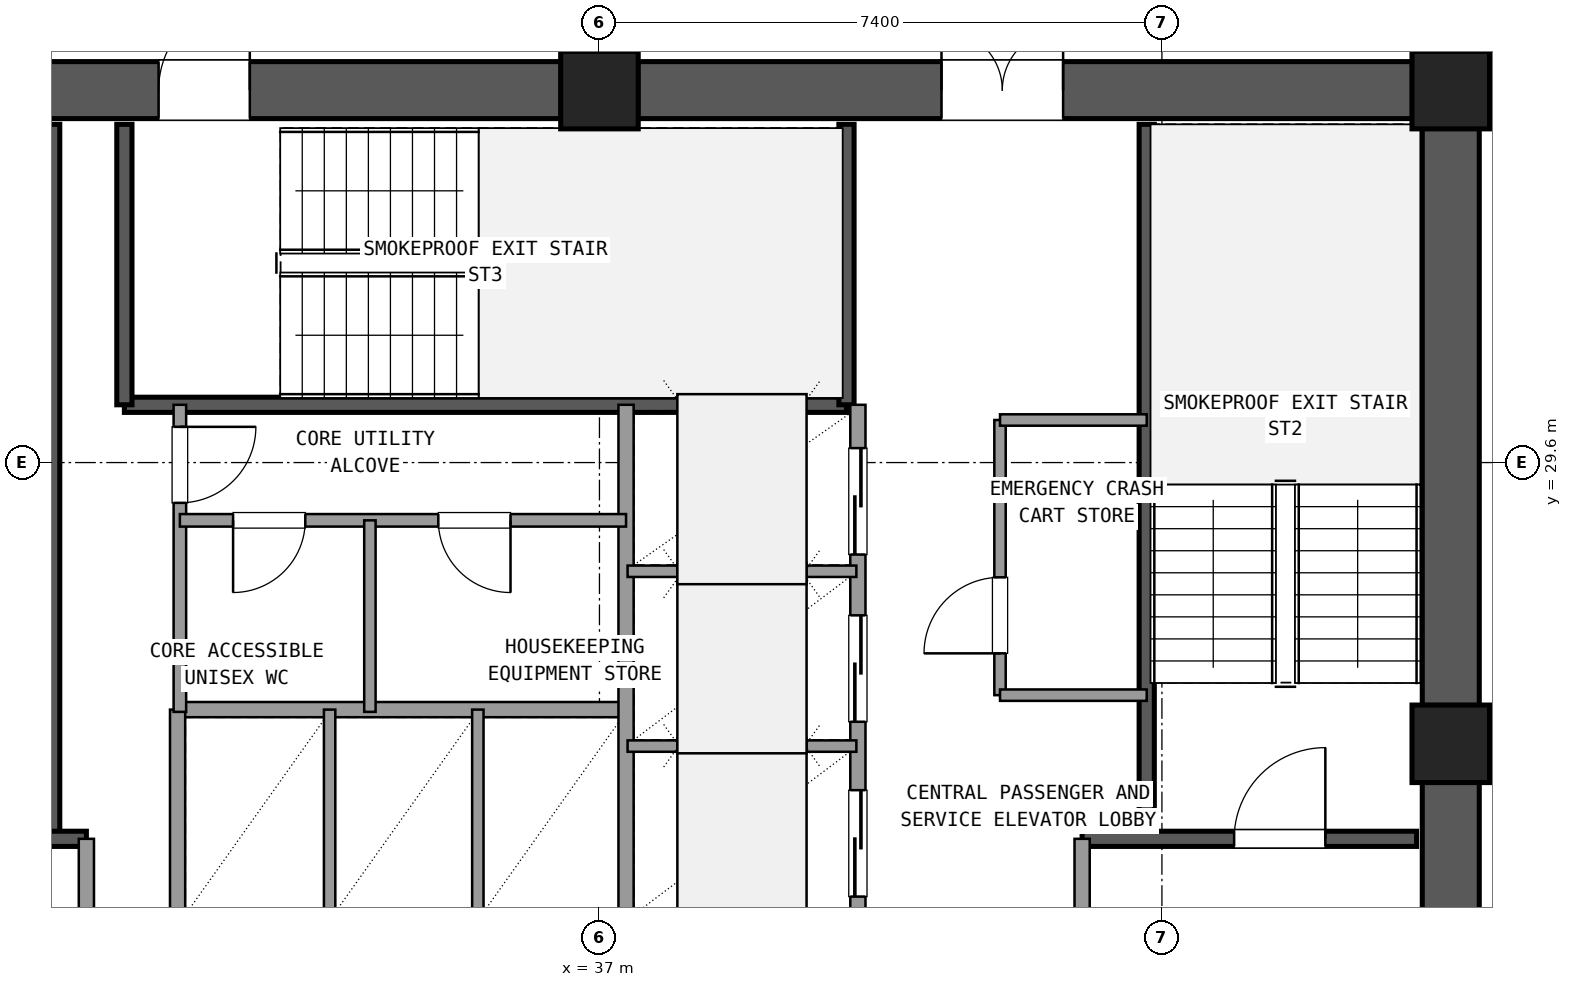
"""IFC4 building model, lengths in metres.
Left out: names, types, materials, properties, quantities, classifications, styles, units other than length and angle.
Written with IfcOpenShell. Run it as: python <this file> out.ifc"""

import sys

from ifc_helpers import new_model, si_unit, direction, frame, frame_2d, origin, origin_2d, place, context, subcontext, project, spatial, rectangle, extrude, element, fill, save


model = new_model("IFC4")
c1 = context("Model", 3, precision=1e-05, world=origin(), true_north=direction((0.0, 1.0)))
c2 = subcontext(c1, "Body", "Model", "MODEL_VIEW")
j1 = project(units=[si_unit("LENGTHUNIT", "METRE"), si_unit("PLANEANGLEUNIT", "RADIAN")], contexts=[c1])
p1 = place(None, origin())
s1 = spatial("IfcSite", under=j1, at=p1, CompositionType="ELEMENT")
p2 = place(p1, origin())
s2 = spatial("IfcBuilding", under=s1, at=p2, CompositionType="ELEMENT")
p3 = place(p2, frame((0.0, 0.0, 91.98)))
s3 = spatial("IfcBuildingStorey", under=s2, at=p3, CompositionType="ELEMENT", Elevation=91.98)
for number, where, z_axis, x_axis in (
    (1, (48.2, 25.9, 0.0), (0.0, 0.0, 1.0), (1.0, 0.0, 0.0)),
    (2, (48.2, 34.5, 0.0), (0.0, 0.0, 1.0), (1.0, 0.0, 0.0)),
    (3, (37.0, 34.5, 0.0), (0.0, 0.0, 1.0), (1.0, 0.0, 0.0)),
):
    element("IfcColumn", number, at=place(p3, frame(where, z_axis=z_axis, x_axis=x_axis)), inside=s3, PredefinedType="COLUMN", context=c2, shape_type="SweptSolid", body=[
        extrude(rectangle(XDim=1.02, YDim=1.02, at=origin_2d()), origin(), (0.0, 0.0, 1.0), 3.6),
    ])
p4 = place(p3, frame((48.2, 17.805, 0.0), z_axis=(0.0, 0.0, 1.0), x_axis=(0.0, 1.0, 0.0)))
e4 = element("IfcWall", 4, at=p4, inside=s3, PredefinedType="SHEAR", context=c2, shape_type="SweptSolid", body=[
    extrude(rectangle(XDim=7.59, YDim=0.75, at=frame_2d((3.795, 0.0))), origin(), (0.0, 0.0, 1.0), 3.32),
])
p5 = place(p4, frame((4.245, 0.0, 0.0)))
e5 = element("IfcOpeningElement", 5, at=p5, cuts=e4, PredefinedType="OPENING", context=c2, shape_type="SweptSolid", body=[
    extrude(rectangle(XDim=1.2, YDim=2.15, at=frame_2d((0.6, 1.075))), frame((0.0, 0.385, 0.0), z_axis=(0.0, -1.0, 0.0), x_axis=(1.0, 0.0, 0.0)), (0.0, 0.0, 1.0), 0.77),
])
p6 = place(p3, frame((48.2, 26.405, 0.0), z_axis=(0.0, 0.0, 1.0), x_axis=(0.0, 1.0, 0.0)))
e6 = element("IfcWall", 6, at=p6, inside=s3, PredefinedType="SHEAR", context=c2, shape_type="SweptSolid", body=[
    extrude(rectangle(XDim=7.59, YDim=0.75, at=frame_2d((3.795, 0.0))), origin(), (0.0, 0.0, 1.0), 3.32),
])
p7 = place(p3, frame((47.695, 34.5, 0.0), z_axis=(0.0, 0.0, 1.0), x_axis=(-1.0, 0.0, 0.0)))
e7 = element("IfcWall", 7, at=p7, inside=s3, PredefinedType="SHEAR", context=c2, shape_type="SweptSolid", body=[
    extrude(rectangle(XDim=10.19, YDim=0.75, at=frame_2d((5.095, 0.0))), origin(), (0.0, 0.0, 1.0), 3.32),
])
p8 = place(p7, frame((4.595, 0.0, 0.0)))
e8 = element("IfcOpeningElement", 8, at=p8, cuts=e7, PredefinedType="OPENING", context=c2, shape_type="SweptSolid", body=[
    extrude(rectangle(XDim=1.6, YDim=2.2, at=frame_2d((0.8, 1.1))), frame((0.0, 0.385, 0.0), z_axis=(0.0, -1.0, 0.0), x_axis=(1.0, 0.0, 0.0)), (0.0, 0.0, 1.0), 0.77),
])
p9 = place(p3, frame((36.495, 34.5, 0.0), z_axis=(0.0, 0.0, 1.0), x_axis=(-1.0, 0.0, 0.0)))
e9 = element("IfcWall", 9, at=p9, inside=s3, PredefinedType="SHEAR", context=c2, shape_type="SweptSolid", body=[
    extrude(rectangle(XDim=10.19, YDim=0.75, at=frame_2d((5.095, 0.0))), origin(), (0.0, 0.0, 1.0), 3.32),
])
p10 = place(p9, frame((4.095, 0.0, 0.0)))
e10 = element("IfcOpeningElement", 10, at=p10, cuts=e9, PredefinedType="OPENING", context=c2, shape_type="SweptSolid", body=[
    extrude(rectangle(XDim=1.2, YDim=2.15, at=frame_2d((0.6, 1.075))), frame((0.0, 0.385, 0.0), z_axis=(0.0, -1.0, 0.0), x_axis=(1.0, 0.0, 0.0)), (0.0, 0.0, 1.0), 0.77),
])
p11 = place(p3, frame((29.8, 24.65, 0.0), z_axis=(0.0, 0.0, 1.0), x_axis=(0.0, 1.0, 0.0)))
e11 = element("IfcWall", 11, at=p11, inside=s3, PredefinedType="SHEAR", context=c2, shape_type="SweptSolid", body=[
    extrude(rectangle(XDim=9.4, YDim=0.2, at=frame_2d((4.7, 0.0))), origin(), (0.0, 0.0, 1.0), 3.32),
])
p12 = place(p3, frame((26.25, 24.65, 0.0), z_axis=(0.0, 0.0, 1.0), x_axis=(1.0, 0.0, 0.0)))
e12 = element("IfcWall", 12, at=p12, inside=s3, PredefinedType="SHEAR", context=c2, shape_type="SweptSolid", body=[
    extrude(rectangle(XDim=4.0, YDim=0.2, at=frame_2d((2.0, 0.0))), origin(), (0.0, 0.0, 1.0), 3.32),
])
p13 = place(p12, frame((1.0, 0.0, 0.0)))
e13 = element("IfcOpeningElement", 13, at=p13, cuts=e12, PredefinedType="OPENING", context=c2, shape_type="SweptSolid", body=[
    extrude(rectangle(XDim=1.2, YDim=2.15, at=frame_2d((0.6, 1.075))), frame((0.0, 0.11, 0.0), z_axis=(0.0, -1.0, 0.0), x_axis=(1.0, 0.0, 0.0)), (0.0, 0.0, 1.0), 0.22),
])
p14 = place(p3, frame((44.2, 24.65, 0.0), z_axis=(0.0, 0.0, 1.0), x_axis=(0.0, 1.0, 0.0)))
e14 = element("IfcWall", 14, at=p14, inside=s3, PredefinedType="SHEAR", context=c2, shape_type="SweptSolid", body=[
    extrude(rectangle(XDim=9.4, YDim=0.2, at=frame_2d((4.7, 0.0))), origin(), (0.0, 0.0, 1.0), 3.32),
])
p15 = place(p3, frame((43.35, 24.65, 0.0), z_axis=(0.0, 0.0, 1.0), x_axis=(1.0, 0.0, 0.0)))
e15 = element("IfcWall", 15, at=p15, inside=s3, PredefinedType="SHEAR", context=c2, shape_type="SweptSolid", body=[
    extrude(rectangle(XDim=4.4, YDim=0.2, at=frame_2d((2.2, 0.0))), origin(), (0.0, 0.0, 1.0), 3.32),
])
p16 = place(p15, frame((2.0, 0.0, 0.0)))
e16 = element("IfcOpeningElement", 16, at=p16, cuts=e15, PredefinedType="OPENING", context=c2, shape_type="SweptSolid", body=[
    extrude(rectangle(XDim=1.2, YDim=2.15, at=frame_2d((0.6, 1.075))), frame((0.0, 0.11, 0.0), z_axis=(0.0, -1.0, 0.0), x_axis=(1.0, 0.0, 0.0)), (0.0, 0.0, 1.0), 0.22),
])
p17 = place(p3, frame((30.75, 30.36, 0.0), z_axis=(0.0, 0.0, 1.0), x_axis=(1.0, 0.0, 0.0)))
e17 = element("IfcWall", 17, at=p17, inside=s3, PredefinedType="SHEAR", context=c2, shape_type="SweptSolid", body=[
    extrude(rectangle(XDim=9.5, YDim=0.2, at=frame_2d((4.75, 0.0))), origin(), (0.0, 0.0, 1.0), 3.32),
])
for number, where, z_axis, x_axis in (
    (18, (30.75, 30.36, 0.0), (0.0, 0.0, 1.0), (0.0, 1.0, 0.0)),
    (19, (40.25, 30.36, 0.0), (0.0, 0.0, 1.0), (0.0, 1.0, 0.0)),
):
    element("IfcWall", number, at=place(p3, frame(where, z_axis=z_axis, x_axis=x_axis)), inside=s3, PredefinedType="SHEAR", context=c2, shape_type="SweptSolid", body=[
        extrude(rectangle(XDim=3.69, YDim=0.2, at=frame_2d((1.845, 0.0))), origin(), (0.0, 0.0, 1.0), 3.32),
    ])
p18 = place(p3, frame((30.25, 17.75, 0.0), z_axis=(0.0, 0.0, 1.0), x_axis=(0.0, 1.0, 0.0)))
e20 = element("IfcWall", 20, at=p18, inside=s3, PredefinedType="SOLIDWALL", context=c2, shape_type="SweptSolid", body=[
    extrude(rectangle(XDim=6.9, YDim=0.2, at=frame_2d((3.45, 0.0))), origin(), (0.0, 0.0, 1.0), 2.61),
])
p19 = place(p18, frame((4.15, 0.0, 0.0)))
e21 = element("IfcOpeningElement", 21, at=p19, cuts=e20, PredefinedType="OPENING", context=c2, shape_type="SweptSolid", body=[
    extrude(rectangle(XDim=1.2, YDim=2.15, at=frame_2d((0.6, 1.075))), frame((0.0, 0.11, 0.0), z_axis=(0.0, -1.0, 0.0), x_axis=(1.0, 0.0, 0.0)), (0.0, 0.0, 1.0), 0.22),
])
p20 = place(p3, frame((43.35, 17.75, 0.0), z_axis=(0.0, 0.0, 1.0), x_axis=(0.0, 1.0, 0.0)))
e22 = element("IfcWall", 22, at=p20, inside=s3, PredefinedType="SOLIDWALL", context=c2, shape_type="SweptSolid", body=[
    extrude(rectangle(XDim=6.9, YDim=0.2, at=frame_2d((3.45, 0.0))), origin(), (0.0, 0.0, 1.0), 2.61),
])
p21 = place(p20, frame((4.15, 0.0, 0.0)))
e23 = element("IfcOpeningElement", 23, at=p21, cuts=e22, PredefinedType="OPENING", context=c2, shape_type="SweptSolid", body=[
    extrude(rectangle(XDim=1.2, YDim=2.15, at=frame_2d((0.6, 1.075))), frame((0.0, 0.11, 0.0), z_axis=(0.0, -1.0, 0.0), x_axis=(1.0, 0.0, 0.0)), (0.0, 0.0, 1.0), 0.22),
])
p22 = place(p3, frame((31.45, 26.35, 0.0), z_axis=(0.0, 0.0, 1.0), x_axis=(1.0, 0.0, 0.0)))
e24 = element("IfcWall", 24, at=p22, inside=s3, PredefinedType="SOLIDWALL", context=c2, shape_type="SweptSolid", body=[
    extrude(rectangle(XDim=5.9, YDim=0.2, at=frame_2d((2.95, 0.0))), origin(), (0.0, 0.0, 1.0), 2.61),
])
p23 = place(p3, frame((31.45, 23.54, 0.0), z_axis=(0.0, 0.0, 1.0), x_axis=(0.0, 1.0, 0.0)))
e25 = element("IfcWall", 25, at=p23, inside=s3, PredefinedType="SOLIDWALL", context=c2, shape_type="SweptSolid", body=[
    extrude(rectangle(XDim=2.81, YDim=0.2, at=frame_2d((1.405, 0.0))), origin(), (0.0, 0.0, 1.0), 2.61),
])
for number, where, z_axis, x_axis in (
    (26, (33.45, 23.54, 0.0), (0.0, 0.0, 1.0), (0.0, 1.0, 0.0)),
    (27, (35.4, 23.54, 0.0), (0.0, 0.0, 1.0), (0.0, 1.0, 0.0)),
):
    element("IfcWall", number, at=place(p3, frame(where, z_axis=z_axis, x_axis=x_axis)), inside=s3, PredefinedType="PARTITIONING", context=c2, shape_type="SweptSolid", body=[
        extrude(rectangle(XDim=2.81, YDim=0.15, at=frame_2d((1.405, 0.0))), origin(), (0.0, 0.0, 1.0), 2.61),
    ])
p24 = place(p3, frame((37.35, 23.54, 0.0), z_axis=(0.0, 0.0, 1.0), x_axis=(0.0, 1.0, 0.0)))
e28 = element("IfcWall", 28, at=p24, inside=s3, PredefinedType="SOLIDWALL", context=c2, shape_type="SweptSolid", body=[
    extrude(rectangle(XDim=6.82, YDim=0.2, at=frame_2d((3.41, 0.0))), origin(), (0.0, 0.0, 1.0), 2.61),
])
p25 = place(p3, frame((40.4, 23.54, 0.0), z_axis=(0.0, 0.0, 1.0), x_axis=(0.0, 1.0, 0.0)))
e29 = element("IfcWall", 29, at=p25, inside=s3, PredefinedType="SOLIDWALL", context=c2, shape_type="SweptSolid", body=[
    extrude(rectangle(XDim=6.82, YDim=0.2, at=frame_2d((3.41, 0.0))), origin(), (0.0, 0.0, 1.0), 2.61),
])
p26 = place(p25, frame((0.35, 0.0, 0.0)))
e30 = element("IfcOpeningElement", 30, at=p26, cuts=e29, PredefinedType="OPENING", context=c2, shape_type="SweptSolid", body=[
    extrude(rectangle(XDim=1.4, YDim=2.2, at=frame_2d((0.7, 1.1))), frame((0.0, 0.11, 0.0), z_axis=(0.0, -1.0, 0.0), x_axis=(1.0, 0.0, 0.0)), (0.0, 0.0, 1.0), 0.22),
])
p27 = place(p25, frame((2.65, 0.0, 0.0)))
e31 = element("IfcOpeningElement", 31, at=p27, cuts=e29, PredefinedType="OPENING", context=c2, shape_type="SweptSolid", body=[
    extrude(rectangle(XDim=1.4, YDim=2.2, at=frame_2d((0.7, 1.1))), frame((0.0, 0.11, 0.0), z_axis=(0.0, -1.0, 0.0), x_axis=(1.0, 0.0, 0.0)), (0.0, 0.0, 1.0), 0.22),
])
p28 = place(p25, frame((4.85, 0.0, 0.0)))
e32 = element("IfcOpeningElement", 32, at=p28, cuts=e29, PredefinedType="OPENING", context=c2, shape_type="SweptSolid", body=[
    extrude(rectangle(XDim=1.4, YDim=2.2, at=frame_2d((0.7, 1.1))), frame((0.0, 0.11, 0.0), z_axis=(0.0, -1.0, 0.0), x_axis=(1.0, 0.0, 0.0)), (0.0, 0.0, 1.0), 0.22),
])
for number, where, z_axis, x_axis in (
    (33, (37.37, 25.87, 0.0), (0.0, 0.0, 1.0), (1.0, 0.0, 0.0)),
    (34, (37.37, 28.17, 0.0), (0.0, 0.0, 1.0), (1.0, 0.0, 0.0)),
):
    element("IfcWall", number, at=place(p3, frame(where, z_axis=z_axis, x_axis=x_axis)), inside=s3, PredefinedType="PARTITIONING", context=c2, shape_type="SweptSolid", body=[
        extrude(rectangle(XDim=3.01, YDim=0.15, at=frame_2d((1.505, 0.0))), origin(), (0.0, 0.0, 1.0), 2.61),
    ])
p29 = place(p3, frame((42.27, 26.54, 0.0), z_axis=(0.0, 0.0, 1.0), x_axis=(0.0, 1.0, 0.0)))
e35 = element("IfcWall", 35, at=p29, inside=s3, PredefinedType="PARTITIONING", context=c2, shape_type="SweptSolid", body=[
    extrude(rectangle(XDim=3.62, YDim=0.15, at=frame_2d((1.81, 0.0))), origin(), (0.0, 0.0, 1.0), 2.61),
])
p30 = place(p29, frame((0.55, 0.0, 0.0)))
e36 = element("IfcOpeningElement", 36, at=p30, cuts=e35, PredefinedType="OPENING", context=c2, shape_type="SweptSolid", body=[
    extrude(rectangle(XDim=1.0, YDim=2.15, at=frame_2d((0.5, 1.075))), frame((0.0, 0.085, 0.0), z_axis=(0.0, -1.0, 0.0), x_axis=(1.0, 0.0, 0.0)), (0.0, 0.0, 1.0), 0.17),
])
for number, where, z_axis, x_axis in (
    (37, (42.27, 26.54, 0.0), (0.0, 0.0, 1.0), (1.0, 0.0, 0.0)),
    (38, (42.27, 30.16, 0.0), (0.0, 0.0, 1.0), (1.0, 0.0, 0.0)),
):
    element("IfcWall", number, at=place(p3, frame(where, z_axis=z_axis, x_axis=x_axis)), inside=s3, PredefinedType="PARTITIONING", context=c2, shape_type="SweptSolid", body=[
        extrude(rectangle(XDim=1.93, YDim=0.15, at=frame_2d((0.965, 0.0))), origin(), (0.0, 0.0, 1.0), 2.61),
    ])
p31 = place(p3, frame((31.48, 26.32, 0.0), z_axis=(0.0, 0.0, 1.0), x_axis=(0.0, 1.0, 0.0)))
e39 = element("IfcWall", 39, at=p31, inside=s3, PredefinedType="PLUMBINGWALL", context=c2, shape_type="SweptSolid", body=[
    extrude(rectangle(XDim=4.04, YDim=0.165, at=frame_2d((2.02, 0.0))), origin(), (0.0, 0.0, 1.0), 2.61),
])
p32 = place(p31, frame((2.75, 0.0, 0.0)))
e40 = element("IfcOpeningElement", 40, at=p32, cuts=e39, PredefinedType="OPENING", context=c2, shape_type="SweptSolid", body=[
    extrude(rectangle(XDim=1.0, YDim=2.15, at=frame_2d((0.5, 1.075))), frame((0.0, 0.093, 0.0), z_axis=(0.0, -1.0, 0.0), x_axis=(1.0, 0.0, 0.0)), (0.0, 0.0, 1.0), 0.185),
])
p33 = place(p3, frame((31.48, 28.84, 0.0), z_axis=(0.0, 0.0, 1.0), x_axis=(1.0, 0.0, 0.0)))
e41 = element("IfcWall", 41, at=p33, inside=s3, PredefinedType="PLUMBINGWALL", context=c2, shape_type="SweptSolid", body=[
    extrude(rectangle(XDim=5.87, YDim=0.165, at=frame_2d((2.935, 0.0))), origin(), (0.0, 0.0, 1.0), 2.61),
])
p34 = place(p33, frame((0.7, 0.0, 0.0)))
e42 = element("IfcOpeningElement", 42, at=p34, cuts=e41, PredefinedType="OPENING", context=c2, shape_type="SweptSolid", body=[
    extrude(rectangle(XDim=0.95, YDim=2.1, at=frame_2d((0.475, 1.05))), frame((0.0, 0.093, 0.0), z_axis=(0.0, -1.0, 0.0), x_axis=(1.0, 0.0, 0.0)), (0.0, 0.0, 1.0), 0.185),
])
p35 = place(p33, frame((3.4, 0.0, 0.0)))
e43 = element("IfcOpeningElement", 43, at=p35, cuts=e41, PredefinedType="OPENING", context=c2, shape_type="SweptSolid", body=[
    extrude(rectangle(XDim=0.95, YDim=2.1, at=frame_2d((0.475, 1.05))), frame((0.0, 0.093, 0.0), z_axis=(0.0, -1.0, 0.0), x_axis=(1.0, 0.0, 0.0)), (0.0, 0.0, 1.0), 0.185),
])
p36 = place(p3, frame((33.98, 26.32, 0.0), z_axis=(0.0, 0.0, 1.0), x_axis=(0.0, 1.0, 0.0)))
e44 = element("IfcWall", 44, at=p36, inside=s3, PredefinedType="PARTITIONING", context=c2, shape_type="SweptSolid", body=[
    extrude(rectangle(XDim=2.52, YDim=0.15, at=frame_2d((1.26, 0.0))), origin(), (0.0, 0.0, 1.0), 2.61),
])
p37 = place(p3, frame((37.0, 34.95, 0.0), z_axis=(0.0, 0.0, 1.0), x_axis=(0.0, 1.0, 0.0)))
e45 = element("IfcWall", 45, at=p37, inside=s3, PredefinedType="PARTITIONING", context=c2, shape_type="SweptSolid", body=[
    extrude(rectangle(XDim=3.21, YDim=0.18, at=frame_2d((1.605, 0.0))), origin(), (0.0, 0.0, 1.0), 2.61),
])
p38 = place(p37, frame((0.605, 0.0, 0.0)))
e46 = element("IfcOpeningElement", 46, at=p38, cuts=e45, PredefinedType="OPENING", context=c2, shape_type="SweptSolid", body=[
    extrude(rectangle(XDim=2.0, YDim=2.2, at=frame_2d((1.0, 1.1))), frame((0.0, 0.1, 0.0), z_axis=(0.0, -1.0, 0.0), x_axis=(1.0, 0.0, 0.0)), (0.0, 0.0, 1.0), 0.2),
])
p39 = place(p16, origin())
e47 = element("IfcDoor", 47, at=p39, inside=s3, OperationType="SINGLE_SWING_RIGHT", PredefinedType="DOOR", context=c2, shape_type="SweptSolid", body=[
    extrude(rectangle(XDim=1.2, YDim=2.15, at=frame_2d((0.6, 1.075))), frame((0.0, 0.025, 0.0), z_axis=(0.0, -1.0, 0.0), x_axis=(1.0, 0.0, 0.0)), (0.0, 0.0, 1.0), 0.05),
])
fill(e16, e47)
p40 = place(p8, frame((1.6, 0.0, 0.0), z_axis=(0.0, 0.0, 1.0), x_axis=(-1.0, 0.0, 0.0)))
e48 = element("IfcDoor", 48, at=p40, inside=s3, OperationType="DOUBLE_DOOR_SINGLE_SWING", PredefinedType="DOOR", context=c2, shape_type="SweptSolid", body=[
    extrude(rectangle(XDim=1.6, YDim=2.2, at=frame_2d((0.8, 1.1))), frame((0.0, 0.025, 0.0), z_axis=(0.0, -1.0, 0.0), x_axis=(1.0, 0.0, 0.0)), (0.0, 0.0, 1.0), 0.05),
])
fill(e8, e48)
p41 = place(p10, frame((1.2, 0.0, 0.0), z_axis=(0.0, 0.0, 1.0), x_axis=(-1.0, 0.0, 0.0)))
e49 = element("IfcDoor", 49, at=p41, inside=s3, OperationType="SINGLE_SWING_LEFT", PredefinedType="DOOR", context=c2, shape_type="SweptSolid", body=[
    extrude(rectangle(XDim=1.2, YDim=2.15, at=frame_2d((0.6, 1.075))), frame((0.0, 0.025, 0.0), z_axis=(0.0, -1.0, 0.0), x_axis=(1.0, 0.0, 0.0)), (0.0, 0.0, 1.0), 0.05),
])
fill(e10, e49)
p42 = place(p26, origin())
e50 = element("IfcDoor", 50, at=p42, inside=s3, OperationType="SLIDING_TO_LEFT", PredefinedType="DOOR", context=c2, shape_type="SweptSolid", body=[
    extrude(rectangle(XDim=1.4, YDim=2.2, at=frame_2d((0.7, 1.1))), frame((0.0, 0.025, 0.0), z_axis=(0.0, -1.0, 0.0), x_axis=(1.0, 0.0, 0.0)), (0.0, 0.0, 1.0), 0.05),
])
fill(e30, e50)
p43 = place(p27, origin())
e51 = element("IfcDoor", 51, at=p43, inside=s3, OperationType="SLIDING_TO_LEFT", PredefinedType="DOOR", context=c2, shape_type="SweptSolid", body=[
    extrude(rectangle(XDim=1.4, YDim=2.2, at=frame_2d((0.7, 1.1))), frame((0.0, 0.025, 0.0), z_axis=(0.0, -1.0, 0.0), x_axis=(1.0, 0.0, 0.0)), (0.0, 0.0, 1.0), 0.05),
])
fill(e31, e51)
p44 = place(p28, origin())
e52 = element("IfcDoor", 52, at=p44, inside=s3, OperationType="SLIDING_TO_RIGHT", PredefinedType="DOOR", context=c2, shape_type="SweptSolid", body=[
    extrude(rectangle(XDim=1.4, YDim=2.2, at=frame_2d((0.7, 1.1))), frame((0.0, 0.025, 0.0), z_axis=(0.0, -1.0, 0.0), x_axis=(1.0, 0.0, 0.0)), (0.0, 0.0, 1.0), 0.05),
])
fill(e32, e52)
p45 = place(p30, origin())
e53 = element("IfcDoor", 53, at=p45, inside=s3, OperationType="SINGLE_SWING_LEFT", PredefinedType="DOOR", context=c2, shape_type="SweptSolid", body=[
    extrude(rectangle(XDim=1.0, YDim=2.15, at=frame_2d((0.5, 1.075))), frame((0.0, 0.025, 0.0), z_axis=(0.0, -1.0, 0.0), x_axis=(1.0, 0.0, 0.0)), (0.0, 0.0, 1.0), 0.05),
])
fill(e36, e53)
p46 = place(p32, frame((1.0, 0.0, 0.0), z_axis=(0.0, 0.0, 1.0), x_axis=(-1.0, 0.0, 0.0)))
e54 = element("IfcDoor", 54, at=p46, inside=s3, OperationType="SINGLE_SWING_RIGHT", PredefinedType="DOOR", context=c2, shape_type="SweptSolid", body=[
    extrude(rectangle(XDim=1.0, YDim=2.15, at=frame_2d((0.5, 1.075))), frame((0.0, 0.025, 0.0), z_axis=(0.0, -1.0, 0.0), x_axis=(1.0, 0.0, 0.0)), (0.0, 0.0, 1.0), 0.05),
])
fill(e40, e54)
p47 = place(p34, frame((0.95, 0.0, 0.0), z_axis=(0.0, 0.0, 1.0), x_axis=(-1.0, 0.0, 0.0)))
e55 = element("IfcDoor", 55, at=p47, inside=s3, OperationType="SINGLE_SWING_LEFT", PredefinedType="DOOR", context=c2, shape_type="SweptSolid", body=[
    extrude(rectangle(XDim=0.95, YDim=2.1, at=frame_2d((0.475, 1.05))), frame((0.0, 0.025, 0.0), z_axis=(0.0, -1.0, 0.0), x_axis=(1.0, 0.0, 0.0)), (0.0, 0.0, 1.0), 0.05),
])
fill(e42, e55)
p48 = place(p35, frame((0.95, 0.0, 0.0), z_axis=(0.0, 0.0, 1.0), x_axis=(-1.0, 0.0, 0.0)))
e56 = element("IfcDoor", 56, at=p48, inside=s3, OperationType="SINGLE_SWING_RIGHT", PredefinedType="DOOR", context=c2, shape_type="SweptSolid", body=[
    extrude(rectangle(XDim=0.95, YDim=2.1, at=frame_2d((0.475, 1.05))), frame((0.0, 0.025, 0.0), z_axis=(0.0, -1.0, 0.0), x_axis=(1.0, 0.0, 0.0)), (0.0, 0.0, 1.0), 0.05),
])
fill(e43, e56)
save(model, sys.argv[1])
